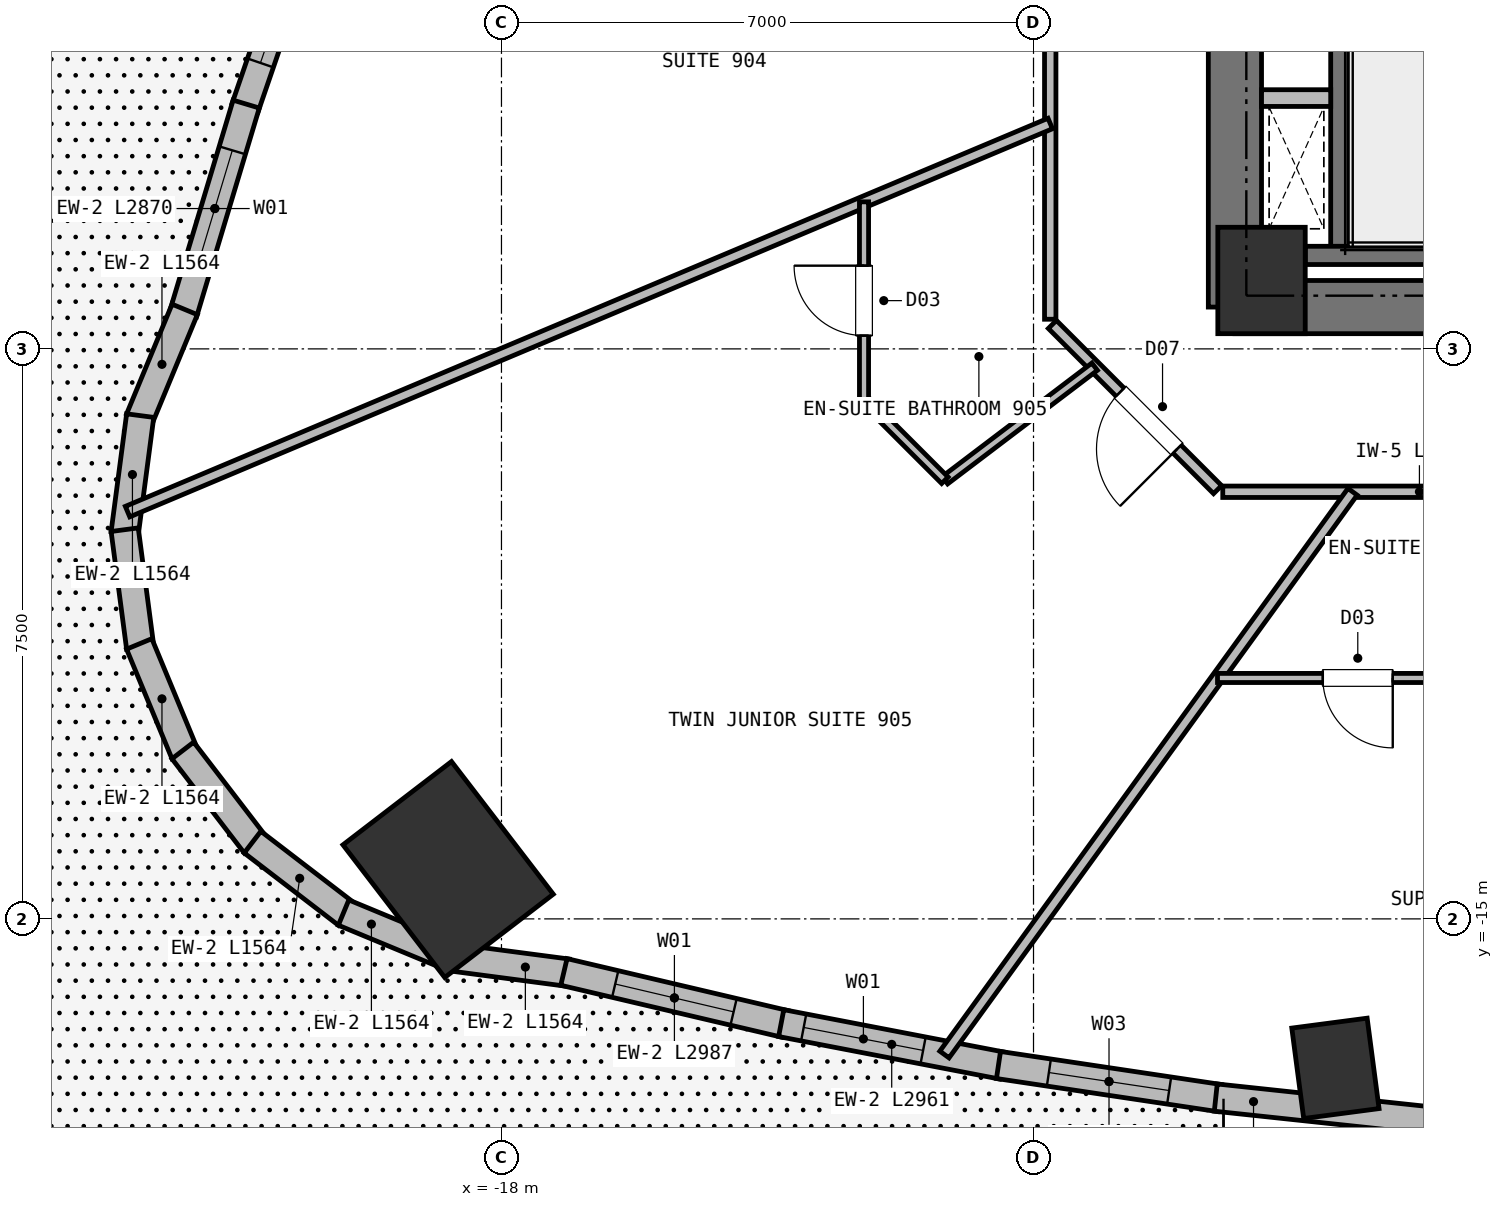
"""IFC4 building model, lengths in metres.
Left out: names, types, materials, properties, quantities, classifications, styles, units other than length and angle.
Written with IfcOpenShell. Run it as: python <this file> out.ifc"""

import sys

from ifc_helpers import new_model, si_unit, direction, frame, frame_2d, origin, origin_2d, place, context, subcontext, project, spatial, rectangle, extrude, element, fill, save


model = new_model("IFC4")
c1 = context("Model", 3, precision=1e-05, world=origin(), true_north=direction((0.0, 1.0)))
c2 = subcontext(c1, "Body", "Model", "MODEL_VIEW")
j1 = project(units=[si_unit("LENGTHUNIT", "METRE"), si_unit("PLANEANGLEUNIT", "RADIAN")], contexts=[c1])
p1 = place(None, origin())
s1 = spatial("IfcSite", under=j1, at=p1, CompositionType="ELEMENT")
p2 = place(p1, origin())
s2 = spatial("IfcBuilding", under=s1, at=p2, CompositionType="ELEMENT")
p3 = place(p2, frame((0.0, 0.0, 30.5)))
s3 = spatial("IfcBuildingStorey", under=s2, at=p3, CompositionType="ELEMENT", Elevation=30.5)
p4 = place(p3, frame((-8.0, -6.6, 0.0), z_axis=(0.0, 0.0, 1.0), x_axis=(1.0, 0.0, 0.0)))
e1 = element("IfcColumn", 1, at=p4, inside=s3, PredefinedType="COLUMN", context=c2, shape_type="SweptSolid", body=[
    extrude(rectangle(XDim=1.15, YDim=1.4, at=origin_2d()), origin(), (0.0, 0.0, 1.0), 3.75),
])
p5 = place(p3, frame((-8.35, -6.95, 0.0), z_axis=(0.0, 0.0, 1.0), x_axis=(1.0, 0.0, 0.0)))
e2 = element("IfcWall", 2, at=p5, inside=s3, PredefinedType="SHEAR", context=c2, shape_type="SweptSolid", body=[
    extrude(rectangle(XDim=3.95, YDim=0.7, at=frame_2d((1.975, 0.0))), origin(), (0.0, 0.0, 1.0), 3.5),
])
p6 = place(p3, frame((-8.35, -6.95, 0.0), z_axis=(0.0, 0.0, 1.0), x_axis=(0.0, 1.0, 0.0)))
e3 = element("IfcWall", 3, at=p6, inside=s3, PredefinedType="SHEAR", context=c2, shape_type="SweptSolid", body=[
    extrude(rectangle(XDim=8.1, YDim=0.7, at=frame_2d((4.05, 0.0))), origin(), (0.0, 0.0, 1.0), 3.5),
])
p7 = place(p3, frame((-18.702, -14.351, 0.0), z_axis=(0.0, 0.0, 1.0), x_axis=(0.793353340291, 0.608761429009, 0.0)))
e4 = element("IfcColumn", 4, at=p7, inside=s3, PredefinedType="COLUMN", context=c2, shape_type="SweptSolid", body=[
    extrude(rectangle(XDim=1.8, YDim=2.2, at=origin_2d()), origin(), (0.0, 0.0, 1.0), 3.75),
])
p8 = place(p3, frame((-7.028, -16.966, 0.0), z_axis=(0.0, 0.0, 1.0), x_axis=(0.991444861374, 0.13052619222, 0.0)))
e5 = element("IfcColumn", 5, at=p8, inside=s3, PredefinedType="COLUMN", context=c2, shape_type="SweptSolid", body=[
    extrude(rectangle(XDim=1.0, YDim=1.2, at=origin_2d()), origin(), (0.0, 0.0, 1.0), 3.75),
])
p9 = place(p3, frame((-21.374, -4.327, 0.0), z_axis=(0.0, 0.0, 1.0), x_axis=(0.325091754677, 0.945682478975, 0.0)))
e6 = element("IfcWall", 6, at=p9, inside=s3, PredefinedType="SOLIDWALL", context=c2, shape_type="SweptSolid", body=[
    extrude(rectangle(XDim=2.846, YDim=0.36, at=frame_2d((1.423, 0.0))), origin(), (0.0, 0.0, 1.0), 3.5),
])
p10 = place(p9, frame((0.623, 0.0, 0.72)))
e7 = element("IfcOpeningElement", 7, at=p10, cuts=e6, PredefinedType="OPENING", context=c2, shape_type="SweptSolid", body=[
    extrude(rectangle(XDim=1.6, YDim=1.88, at=frame_2d((0.8, 0.94))), frame((0.0, 0.19, 0.0), z_axis=(0.0, -1.0, 0.0), x_axis=(1.0, 0.0, 0.0)), (0.0, 0.0, 1.0), 0.38),
])
p11 = place(p3, frame((-22.184, -7.028, 0.0), z_axis=(0.0, 0.0, 1.0), x_axis=(0.287784902043, 0.957695071594, 0.0)))
e8 = element("IfcWall", 8, at=p11, inside=s3, PredefinedType="SOLIDWALL", context=c2, shape_type="SweptSolid", body=[
    extrude(rectangle(XDim=2.87, YDim=0.36, at=frame_2d((1.435, 0.0))), origin(), (0.0, 0.0, 1.0), 3.5),
])
p12 = place(p11, frame((0.635, 0.0, 0.72)))
e9 = element("IfcOpeningElement", 9, at=p12, cuts=e8, PredefinedType="OPENING", context=c2, shape_type="SweptSolid", body=[
    extrude(rectangle(XDim=1.6, YDim=1.88, at=frame_2d((0.8, 0.94))), frame((0.0, 0.19, 0.0), z_axis=(0.0, -1.0, 0.0), x_axis=(1.0, 0.0, 0.0)), (0.0, 0.0, 1.0), 0.38),
])
for number, where, z_axis, x_axis in (
    (10, (-22.766, -8.426, 0.0), (0.0, 0.0, 1.0), (0.383, 0.924, 0.0)),
    (11, (-22.958, -9.929, 0.0), (0.0, 0.0, 1.0), (0.131, 0.991, 0.0)),
    (12, (-22.753, -11.43, 0.0), (0.0, 0.0, 1.0), (-0.131, 0.991, 0.0)),
):
    element("IfcWall", number, at=place(p3, frame(where, z_axis=z_axis, x_axis=x_axis)), inside=s3, PredefinedType="SOLIDWALL", context=c2, shape_type="SweptSolid", body=[
        extrude(rectangle(XDim=1.564, YDim=0.36, at=frame_2d((0.782, 0.0))), origin(), (0.0, 0.0, 1.0), 3.5),
    ])
p13 = place(p3, frame((-22.167, -12.827, 0.0), z_axis=(0.0, 0.0, 1.0), x_axis=(-0.382774588958, 0.923841768945, 0.0)))
e13 = element("IfcWall", 13, at=p13, inside=s3, PredefinedType="SOLIDWALL", context=c2, shape_type="SweptSolid", body=[
    extrude(rectangle(XDim=1.564, YDim=0.36, at=frame_2d((0.782, 0.0))), origin(), (0.0, 0.0, 1.0), 3.5),
])
for number, where, z_axis, x_axis in (
    (14, (-21.24, -14.025, 0.0), (0.0, 0.0, 1.0), (-0.609, 0.793, 0.0)),
    (15, (-20.034, -14.942, 0.0), (0.0, 0.0, 1.0), (-0.793, 0.609, 0.0)),
    (16, (-18.632, -15.516, 0.0), (0.0, 0.0, 1.0), (-0.924, 0.383, 0.0)),
    (17, (-17.129, -15.707, 0.0), (0.0, 0.0, 1.0), (-0.991, 0.131, 0.0)),
):
    element("IfcWall", number, at=place(p3, frame(where, z_axis=z_axis, x_axis=x_axis)), inside=s3, PredefinedType="SOLIDWALL", context=c2, shape_type="SweptSolid", body=[
        extrude(rectangle(XDim=1.564, YDim=0.36, at=frame_2d((0.782, 0.0))), origin(), (0.0, 0.0, 1.0), 3.5),
    ])
p14 = place(p3, frame((-14.271, -16.382, 0.0), z_axis=(0.0, 0.0, 1.0), x_axis=(-0.973460028485, 0.228857101575, 0.0)))
e18 = element("IfcWall", 18, at=p14, inside=s3, PredefinedType="SOLIDWALL", context=c2, shape_type="SweptSolid", body=[
    extrude(rectangle(XDim=2.987, YDim=0.36, at=frame_2d((1.494, 0.0))), origin(), (0.0, 0.0, 1.0), 3.5),
])
p15 = place(p14, frame((0.694, 0.0, 0.72)))
e19 = element("IfcOpeningElement", 19, at=p15, cuts=e18, PredefinedType="OPENING", context=c2, shape_type="SweptSolid", body=[
    extrude(rectangle(XDim=1.6, YDim=1.88, at=frame_2d((0.8, 0.94))), frame((0.0, 0.19, 0.0), z_axis=(0.0, -1.0, 0.0), x_axis=(1.0, 0.0, 0.0)), (0.0, 0.0, 1.0), 0.38),
])
p16 = place(p3, frame((-11.412, -16.931, 0.0), z_axis=(0.0, 0.0, 1.0), x_axis=(-0.981984682903, 0.188960531711, 0.0)))
e20 = element("IfcWall", 20, at=p16, inside=s3, PredefinedType="SOLIDWALL", context=c2, shape_type="SweptSolid", body=[
    extrude(rectangle(XDim=2.961, YDim=0.36, at=frame_2d((1.481, 0.0))), origin(), (0.0, 0.0, 1.0), 3.5),
])
p17 = place(p16, frame((1.06, 0.0, 0.72)))
e21 = element("IfcOpeningElement", 21, at=p17, cuts=e20, PredefinedType="OPENING", context=c2, shape_type="SweptSolid", body=[
    extrude(rectangle(XDim=1.6, YDim=1.88, at=frame_2d((0.8, 0.94))), frame((0.0, 0.19, 0.0), z_axis=(0.0, -1.0, 0.0), x_axis=(1.0, 0.0, 0.0)), (0.0, 0.0, 1.0), 0.38),
])
p18 = place(p3, frame((-8.552, -17.358, 0.0), z_axis=(0.0, 0.0, 1.0), x_axis=(-0.988982587095, 0.148031896641, 0.0)))
e22 = element("IfcWall", 22, at=p18, inside=s3, PredefinedType="SOLIDWALL", context=c2, shape_type="SweptSolid", body=[
    extrude(rectangle(XDim=2.941, YDim=0.36, at=frame_2d((1.47, 0.0))), origin(), (0.0, 0.0, 1.0), 3.5),
])
p19 = place(p18, frame((0.67, 0.0, 0.72)))
e23 = element("IfcOpeningElement", 23, at=p19, cuts=e22, PredefinedType="OPENING", context=c2, shape_type="SweptSolid", body=[
    extrude(rectangle(XDim=1.6, YDim=1.88, at=frame_2d((0.8, 0.94))), frame((0.0, 0.19, 0.0), z_axis=(0.0, -1.0, 0.0), x_axis=(1.0, 0.0, 0.0)), (0.0, 0.0, 1.0), 0.38),
])
p20 = place(p3, frame((-5.693, -17.662, 0.0), z_axis=(0.0, 0.0, 1.0), x_axis=(-0.994340996166, 0.106235508864, 0.0)))
e24 = element("IfcWall", 24, at=p20, inside=s3, PredefinedType="SOLIDWALL", context=c2, shape_type="SweptSolid", body=[
    extrude(rectangle(XDim=2.926, YDim=0.36, at=frame_2d((1.463, 0.0))), origin(), (0.0, 0.0, 1.0), 3.5),
])
p21 = place(p3, frame((-6.97, -6.16, 0.0), z_axis=(0.0, 0.0, 1.0), x_axis=(0.0, 1.0, 0.0)))
e25 = element("IfcWall", 25, at=p21, inside=s3, PredefinedType="SHEAR", context=c2, shape_type="SweptSolid", body=[
    extrude(rectangle(XDim=7.22, YDim=0.24, at=frame_2d((3.61, 0.0))), origin(), (0.0, 0.0, 1.0), 3.5),
])
p22 = place(p3, frame((-7.425, -6.27, 0.0), z_axis=(0.0, 0.0, 1.0), x_axis=(1.0, 0.0, 0.0)))
e26 = element("IfcWall", 26, at=p22, inside=s3, PredefinedType="SHEAR", context=c2, shape_type="SweptSolid", body=[
    extrude(rectangle(XDim=3.415, YDim=0.24, at=frame_2d((1.708, 0.0))), origin(), (0.0, 0.0, 1.0), 3.5),
])
p23 = place(p3, frame((-8.0, -4.2, 0.0), z_axis=(0.0, 0.0, 1.0), x_axis=(1.0, 0.0, 0.0)))
e27 = element("IfcWall", 27, at=p23, inside=s3, PredefinedType="PARTITIONING", context=c2, shape_type="SweptSolid", body=[
    extrude(rectangle(XDim=0.91, YDim=0.22, at=frame_2d((0.455, 0.0))), origin(), (0.0, 0.0, 1.0), 3.5),
])
p24 = place(p3, frame((8.51, -9.38, 0.0), z_axis=(0.0, 0.0, 1.0), x_axis=(-1.0, 0.0, 0.0)))
e28 = element("IfcWall", 28, at=p24, inside=s3, PredefinedType="PARTITIONING", context=c2, shape_type="SweptSolid", body=[
    extrude(rectangle(XDim=17.02, YDim=0.15, at=frame_2d((8.51, 0.0))), origin(), (0.0, 0.0, 1.0), 3.5),
])
p25 = place(p24, frame((6.065, 0.0, 0.0)))
e29 = element("IfcOpeningElement", 29, at=p25, cuts=e28, PredefinedType="OPENING", context=c2, shape_type="SweptSolid", body=[
    extrude(rectangle(XDim=1.0, YDim=2.15, at=frame_2d((0.5, 1.075))), frame((0.0, 0.085, 0.0), z_axis=(0.0, -1.0, 0.0), x_axis=(1.0, 0.0, 0.0)), (0.0, 0.0, 1.0), 0.17),
])
p26 = place(p24, frame((10.745, 0.0, 0.0)))
e30 = element("IfcOpeningElement", 30, at=p26, cuts=e28, PredefinedType="OPENING", context=c2, shape_type="SweptSolid", body=[
    extrude(rectangle(XDim=1.0, YDim=2.15, at=frame_2d((0.5, 1.075))), frame((0.0, 0.085, 0.0), z_axis=(0.0, -1.0, 0.0), x_axis=(1.0, 0.0, 0.0)), (0.0, 0.0, 1.0), 0.17),
])
p27 = place(p24, frame((0.14, 0.0, 0.0)))
e31 = element("IfcOpeningElement", 31, at=p27, cuts=e28, PredefinedType="OPENING", context=c2, shape_type="SweptSolid", body=[
    extrude(rectangle(XDim=1.06, YDim=2.15, at=frame_2d((0.53, 1.075))), frame((0.0, 0.085, 0.0), z_axis=(0.0, -1.0, 0.0), x_axis=(1.0, 0.0, 0.0)), (0.0, 0.0, 1.0), 0.17),
])
p28 = place(p3, frame((-10.78, -7.11, 0.0), z_axis=(0.0, 0.0, 1.0), x_axis=(0.0, 1.0, 0.0)))
e32 = element("IfcWall", 32, at=p28, inside=s3, PredefinedType="PARTITIONING", context=c2, shape_type="SweptSolid", body=[
    extrude(rectangle(XDim=14.22, YDim=0.15, at=frame_2d((7.11, 0.0))), origin(), (0.0, 0.0, 1.0), 3.12),
])
p29 = place(p28, frame((10.606, 0.0, 0.0)))
e33 = element("IfcOpeningElement", 33, at=p29, cuts=e32, PredefinedType="OPENING", context=c2, shape_type="SweptSolid", body=[
    extrude(rectangle(XDim=1.0, YDim=2.15, at=frame_2d((0.5, 1.075))), frame((0.0, 0.085, 0.0), z_axis=(0.0, -1.0, 0.0), x_axis=(1.0, 0.0, 0.0)), (0.0, 0.0, 1.0), 0.17),
])
p30 = place(p28, frame((3.57, 0.0, 0.0)))
e34 = element("IfcOpeningElement", 34, at=p30, cuts=e32, PredefinedType="OPENING", context=c2, shape_type="SweptSolid", body=[
    extrude(rectangle(XDim=1.06, YDim=2.15, at=frame_2d((0.53, 1.075))), frame((0.0, 0.085, 0.0), z_axis=(0.0, -1.0, 0.0), x_axis=(1.0, 0.0, 0.0)), (0.0, 0.0, 1.0), 0.17),
])
p31 = place(p3, frame((-8.578, -9.352, 0.0), z_axis=(0.0, 0.0, 1.0), x_axis=(-0.707067066127, 0.707146494016, 0.0)))
e35 = element("IfcWall", 35, at=p31, inside=s3, PredefinedType="PARTITIONING", context=c2, shape_type="SweptSolid", body=[
    extrude(rectangle(XDim=3.074, YDim=0.15, at=frame_2d((1.537, 0.0))), origin(), (0.0, 0.0, 1.0), 3.5),
])
p32 = place(p31, frame((0.754, 0.0, 0.0)))
e36 = element("IfcOpeningElement", 36, at=p32, cuts=e35, PredefinedType="OPENING", context=c2, shape_type="SweptSolid", body=[
    extrude(rectangle(XDim=1.06, YDim=2.15, at=frame_2d((0.53, 1.075))), frame((0.0, 0.085, 0.0), z_axis=(0.0, -1.0, 0.0), x_axis=(1.0, 0.0, 0.0)), (0.0, 0.0, 1.0), 0.17),
])
p33 = place(p3, frame((-10.78, -4.535, 0.0), z_axis=(0.0, 0.0, 1.0), x_axis=(-0.921767922979, -0.387742048489, 0.0)))
e37 = element("IfcWall", 37, at=p33, inside=s3, PredefinedType="PARTITIONING", context=c2, shape_type="SweptSolid", body=[
    extrude(rectangle(XDim=13.17, YDim=0.15, at=frame_2d((6.585, 0.0))), origin(), (0.0, 0.0, 1.0), 3.5),
])
p34 = place(p3, frame((-12.166, -9.229, 0.0), z_axis=(0.0, 0.0, 1.0), x_axis=(0.796694549239, 0.604382159906, 0.0)))
e38 = element("IfcWall", 38, at=p34, inside=s3, PredefinedType="PARTITIONING", context=c2, shape_type="SweptSolid", body=[
    extrude(rectangle(XDim=2.473, YDim=0.12, at=frame_2d((1.236, 0.0))), origin(), (0.0, 0.0, 1.0), 3.5),
])
p35 = place(p3, frame((-12.166, -9.229, 0.0), z_axis=(0.0, 0.0, 1.0), x_axis=(-0.707106781187, 0.707106781187, 0.0)))
e39 = element("IfcWall", 39, at=p35, inside=s3, PredefinedType="PARTITIONING", context=c2, shape_type="SweptSolid", body=[
    extrude(rectangle(XDim=1.505, YDim=0.12, at=frame_2d((0.752, 0.0))), origin(), (0.0, 0.0, 1.0), 3.5),
])
p36 = place(p3, frame((-13.23, -8.165, 0.0), z_axis=(0.0, 0.0, 1.0), x_axis=(0.0, 1.0, 0.0)))
e40 = element("IfcWall", 40, at=p36, inside=s3, PredefinedType="PARTITIONING", context=c2, shape_type="SweptSolid", body=[
    extrude(rectangle(XDim=2.6, YDim=0.12, at=frame_2d((1.3, 0.0))), origin(), (0.0, 0.0, 1.0), 3.12),
])
p37 = place(p36, frame((0.84, 0.0, 0.0)))
e41 = element("IfcOpeningElement", 41, at=p37, cuts=e40, PredefinedType="OPENING", context=c2, shape_type="SweptSolid", body=[
    extrude(rectangle(XDim=0.92, YDim=2.1, at=frame_2d((0.46, 1.05))), frame((0.0, 0.07, 0.0), z_axis=(0.0, -1.0, 0.0), x_axis=(1.0, 0.0, 0.0)), (0.0, 0.0, 1.0), 0.14),
])
p38 = place(p3, frame((-6.802, -9.38, 0.0), z_axis=(0.0, 0.0, 1.0), x_axis=(-0.58706335667, -0.809540990472, 0.0)))
e42 = element("IfcWall", 42, at=p38, inside=s3, PredefinedType="PARTITIONING", context=c2, shape_type="SweptSolid", body=[
    extrude(rectangle(XDim=9.146, YDim=0.15, at=frame_2d((4.573, 0.0))), origin(), (0.0, 0.0, 1.0), 3.5),
])
p39 = place(p3, frame((-4.888, -11.83, 0.0), z_axis=(0.0, 0.0, 1.0), x_axis=(-1.0, 0.0, 0.0)))
e43 = element("IfcWall", 43, at=p39, inside=s3, PredefinedType="PARTITIONING", context=c2, shape_type="SweptSolid", body=[
    extrude(rectangle(XDim=3.691, YDim=0.12, at=frame_2d((1.846, 0.0))), origin(), (0.0, 0.0, 1.0), 3.5),
])
p40 = place(p39, frame((1.385, 0.0, 0.0)))
e44 = element("IfcOpeningElement", 44, at=p40, cuts=e43, PredefinedType="OPENING", context=c2, shape_type="SweptSolid", body=[
    extrude(rectangle(XDim=0.92, YDim=2.1, at=frame_2d((0.46, 1.05))), frame((0.0, 0.07, 0.0), z_axis=(0.0, -1.0, 0.0), x_axis=(1.0, 0.0, 0.0)), (0.0, 0.0, 1.0), 0.14),
])
p41 = place(p10, origin())
e45 = element("IfcWindow", 45, at=p41, inside=s3, PartitioningType="SINGLE_PANEL", PredefinedType="WINDOW", context=c2, shape_type="SweptSolid", body=[
    extrude(rectangle(XDim=1.6, YDim=1.88, at=frame_2d((0.8, 0.94))), frame((0.0, 0.03, 0.0), z_axis=(0.0, -1.0, 0.0), x_axis=(1.0, 0.0, 0.0)), (0.0, 0.0, 1.0), 0.06),
])
fill(e7, e45)
p42 = place(p12, origin())
e46 = element("IfcWindow", 46, at=p42, inside=s3, PartitioningType="SINGLE_PANEL", PredefinedType="WINDOW", context=c2, shape_type="SweptSolid", body=[
    extrude(rectangle(XDim=1.6, YDim=1.88, at=frame_2d((0.8, 0.94))), frame((0.0, 0.03, 0.0), z_axis=(0.0, -1.0, 0.0), x_axis=(1.0, 0.0, 0.0)), (0.0, 0.0, 1.0), 0.06),
])
fill(e9, e46)
p43 = place(p15, origin())
e47 = element("IfcWindow", 47, at=p43, inside=s3, PartitioningType="SINGLE_PANEL", PredefinedType="WINDOW", context=c2, shape_type="SweptSolid", body=[
    extrude(rectangle(XDim=1.6, YDim=1.88, at=frame_2d((0.8, 0.94))), frame((0.0, 0.03, 0.0), z_axis=(0.0, -1.0, 0.0), x_axis=(1.0, 0.0, 0.0)), (0.0, 0.0, 1.0), 0.06),
])
fill(e19, e47)
p44 = place(p17, origin())
e48 = element("IfcWindow", 48, at=p44, inside=s3, PartitioningType="SINGLE_PANEL", PredefinedType="WINDOW", context=c2, shape_type="SweptSolid", body=[
    extrude(rectangle(XDim=1.6, YDim=1.88, at=frame_2d((0.8, 0.94))), frame((0.0, 0.03, 0.0), z_axis=(0.0, -1.0, 0.0), x_axis=(1.0, 0.0, 0.0)), (0.0, 0.0, 1.0), 0.06),
])
fill(e21, e48)
p45 = place(p19, origin())
e49 = element("IfcWindow", 49, at=p45, inside=s3, PartitioningType="SINGLE_PANEL", PredefinedType="WINDOW", context=c2, shape_type="SweptSolid", body=[
    extrude(rectangle(XDim=1.6, YDim=1.88, at=frame_2d((0.8, 0.94))), frame((0.0, 0.03, 0.0), z_axis=(0.0, -1.0, 0.0), x_axis=(1.0, 0.0, 0.0)), (0.0, 0.0, 1.0), 0.06),
])
fill(e23, e49)
p46 = place(p37, origin())
e50 = element("IfcDoor", 50, at=p46, inside=s3, OperationType="SINGLE_SWING_RIGHT", PredefinedType="DOOR", context=c2, shape_type="SweptSolid", body=[
    extrude(rectangle(XDim=0.92, YDim=2.1, at=frame_2d((0.46, 1.05))), frame((0.0, 0.025, 0.0), z_axis=(0.0, -1.0, 0.0), x_axis=(1.0, 0.0, 0.0)), (0.0, 0.0, 1.0), 0.05),
])
fill(e41, e50)
p47 = place(p40, origin())
e51 = element("IfcDoor", 51, at=p47, inside=s3, OperationType="SINGLE_SWING_LEFT", PredefinedType="DOOR", context=c2, shape_type="SweptSolid", body=[
    extrude(rectangle(XDim=0.92, YDim=2.1, at=frame_2d((0.46, 1.05))), frame((0.0, 0.025, 0.0), z_axis=(0.0, -1.0, 0.0), x_axis=(1.0, 0.0, 0.0)), (0.0, 0.0, 1.0), 0.05),
])
fill(e44, e51)
p48 = place(p32, origin())
e52 = element("IfcDoor", 52, at=p48, inside=s3, OperationType="SINGLE_SWING_LEFT", PredefinedType="DOOR", context=c2, shape_type="SweptSolid", body=[
    extrude(rectangle(XDim=1.06, YDim=2.15, at=frame_2d((0.53, 1.075))), frame((0.0, 0.025, 0.0), z_axis=(0.0, -1.0, 0.0), x_axis=(1.0, 0.0, 0.0)), (0.0, 0.0, 1.0), 0.05),
])
fill(e36, e52)
save(model, sys.argv[1])
